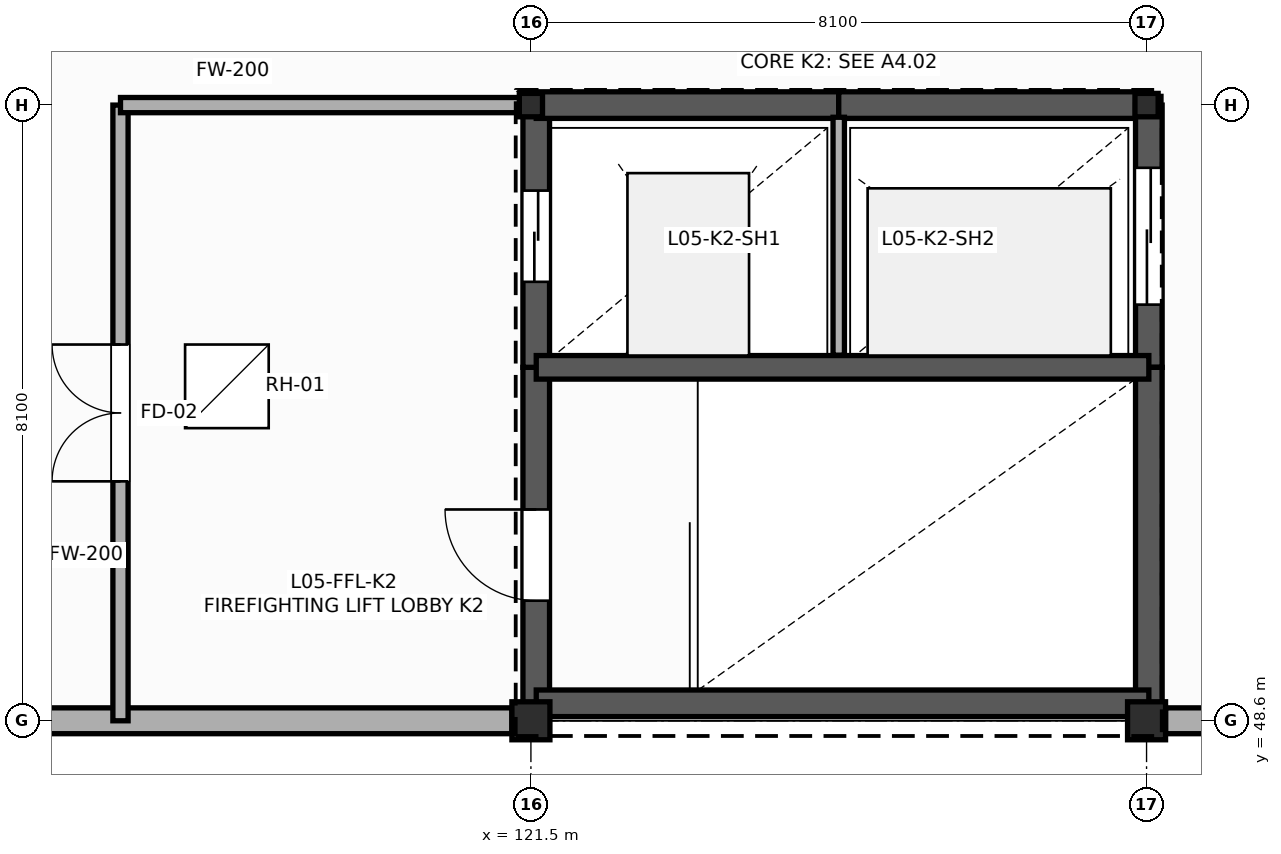
"""IFC4 building model, lengths in metres.
Left out: names, types, materials, properties, quantities, classifications, styles, units other than length and angle.
Written with IfcOpenShell. Run it as: python <this file> out.ifc"""

import sys

from ifc_helpers import new_model, si_unit, direction, frame, frame_2d, origin, origin_2d, place, context, subcontext, project, spatial, rectangle, i_section, extrude, element, fill, save


model = new_model("IFC4")
c1 = context("Model", 3, precision=1e-05, world=origin(), true_north=direction((0.0, 1.0)))
c2 = subcontext(c1, "Body", "Model", "MODEL_VIEW")
j1 = project(units=[si_unit("LENGTHUNIT", "METRE"), si_unit("PLANEANGLEUNIT", "RADIAN")], contexts=[c1])
p1 = place(None, origin())
s1 = spatial("IfcSite", under=j1, at=p1, CompositionType="ELEMENT")
p2 = place(p1, origin())
s2 = spatial("IfcBuilding", under=s1, at=p2, CompositionType="ELEMENT")
p3 = place(p2, frame((0.0, 0.0, 23.4)))
s3 = spatial("IfcBuildingStorey", under=s2, at=p3, CompositionType="ELEMENT", Elevation=23.4)
p4 = place(p3, frame((121.5, 48.6, 0.0), z_axis=(0.0, 0.0, 1.0), x_axis=(1.0, 0.0, 0.0)))
e1 = element("IfcColumn", 1, at=p4, inside=s3, PredefinedType="COLUMN", context=c2, shape_type="SweptSolid", body=[
    extrude(rectangle(XDim=0.5, YDim=0.5, at=origin_2d()), origin(), (0.0, 0.0, 1.0), 4.2),
])
p5 = place(p3, frame((121.5, 56.7, 0.0), z_axis=(0.0, 0.0, 1.0), x_axis=(1.0, 0.0, 0.0)))
e2 = element("IfcColumn", 2, at=p5, inside=s3, PredefinedType="COLUMN", context=c2, shape_type="SweptSolid", body=[
    extrude(i_section(OverallWidth=0.305, OverallDepth=0.308, WebThickness=0.01, FlangeThickness=0.015, FilletRadius=0.015, at=origin_2d()), origin(), (0.0, 0.0, 1.0), 4.2),
])
p6 = place(p3, frame((129.6, 48.6, 0.0), z_axis=(0.0, 0.0, 1.0), x_axis=(1.0, 0.0, 0.0)))
e3 = element("IfcColumn", 3, at=p6, inside=s3, PredefinedType="COLUMN", context=c2, shape_type="SweptSolid", body=[
    extrude(rectangle(XDim=0.5, YDim=0.5, at=origin_2d()), origin(), (0.0, 0.0, 1.0), 4.2),
])
p7 = place(p3, frame((129.6, 56.7, 0.0), z_axis=(0.0, 0.0, 1.0), x_axis=(1.0, 0.0, 0.0)))
e4 = element("IfcColumn", 4, at=p7, inside=s3, PredefinedType="COLUMN", context=c2, shape_type="SweptSolid", body=[
    extrude(i_section(OverallWidth=0.305, OverallDepth=0.308, WebThickness=0.01, FlangeThickness=0.015, FilletRadius=0.015, at=origin_2d()), origin(), (0.0, 0.0, 1.0), 4.2),
])
p8 = place(p3, frame((113.65, 48.6, 0.0), z_axis=(0.0, 0.0, 1.0), x_axis=(1.0, 0.0, 0.0)))
e5 = element("IfcWall", 5, at=p8, inside=s3, PredefinedType="SOLIDWALL", context=c2, shape_type="SweptSolid", body=[
    extrude(rectangle(XDim=7.6, YDim=0.34, at=frame_2d((3.8, 0.0))), origin(), (0.0, 0.0, 1.0), 3.495),
])
p9 = place(p3, frame((129.85, 48.6, 0.0), z_axis=(0.0, 0.0, 1.0), x_axis=(1.0, 0.0, 0.0)))
e6 = element("IfcWall", 6, at=p9, inside=s3, PredefinedType="SOLIDWALL", context=c2, shape_type="SweptSolid", body=[
    extrude(rectangle(XDim=7.6, YDim=0.34, at=frame_2d((3.8, 0.0))), origin(), (0.0, 0.0, 1.0), 3.495),
])
p10 = place(p3, frame((121.57, 48.83, 0.0), z_axis=(0.0, 0.0, 1.0), x_axis=(0.0, 1.0, 0.0)))
e7 = element("IfcWall", 7, at=p10, inside=s3, PredefinedType="SHEAR", context=c2, shape_type="SweptSolid", body=[
    extrude(rectangle(XDim=4.42, YDim=0.35, at=frame_2d((2.21, 0.0))), origin(), (0.0, 0.0, 1.0), 4.2),
])
p11 = place(p10, frame((1.35, 0.0, 0.0)))
e8 = element("IfcOpeningElement", 8, at=p11, cuts=e7, PredefinedType="OPENING", context=c2, shape_type="SweptSolid", body=[
    extrude(rectangle(XDim=1.2, YDim=2.25, at=frame_2d((0.6, 1.125))), frame((0.0, 0.185, 0.0), z_axis=(0.0, -1.0, 0.0), x_axis=(1.0, 0.0, 0.0)), (0.0, 0.0, 1.0), 0.37),
])
p12 = place(p3, frame((121.57, 53.25, 0.0), z_axis=(0.0, 0.0, 1.0), x_axis=(0.0, 1.0, 0.0)))
e9 = element("IfcWall", 9, at=p12, inside=s3, PredefinedType="SHEAR", context=c2, shape_type="SweptSolid", body=[
    extrude(rectangle(XDim=3.45, YDim=0.35, at=frame_2d((1.725, 0.0))), origin(), (0.0, 0.0, 1.0), 4.2),
])
p13 = place(p12, frame((1.125, 0.0, 0.0)))
e10 = element("IfcOpeningElement", 10, at=p13, cuts=e9, PredefinedType="OPENING", context=c2, shape_type="SweptSolid", body=[
    extrude(rectangle(XDim=1.2, YDim=2.2, at=frame_2d((0.6, 1.1))), frame((0.0, 0.185, 0.0), z_axis=(0.0, -1.0, 0.0), x_axis=(1.0, 0.0, 0.0)), (0.0, 0.0, 1.0), 0.37),
])
p14 = place(p3, frame((121.57, 56.7, 0.0), z_axis=(0.0, 0.0, 1.0), x_axis=(1.0, 0.0, 0.0)))
e11 = element("IfcWall", 11, at=p14, inside=s3, PredefinedType="SHEAR", context=c2, shape_type="SweptSolid", body=[
    extrude(rectangle(XDim=3.98, YDim=0.35, at=frame_2d((1.99, 0.0))), origin(), (0.0, 0.0, 1.0), 4.2),
])
p15 = place(p3, frame((125.55, 56.7, 0.0), z_axis=(0.0, 0.0, 1.0), x_axis=(1.0, 0.0, 0.0)))
e12 = element("IfcWall", 12, at=p15, inside=s3, PredefinedType="SHEAR", context=c2, shape_type="SweptSolid", body=[
    extrude(rectangle(XDim=4.08, YDim=0.35, at=frame_2d((2.04, 0.0))), origin(), (0.0, 0.0, 1.0), 4.2),
])
p16 = place(p3, frame((129.63, 56.7, 0.0), z_axis=(0.0, 0.0, 1.0), x_axis=(0.0, -1.0, 0.0)))
e13 = element("IfcWall", 13, at=p16, inside=s3, PredefinedType="SHEAR", context=c2, shape_type="SweptSolid", body=[
    extrude(rectangle(XDim=3.45, YDim=0.35, at=frame_2d((1.725, 0.0))), origin(), (0.0, 0.0, 1.0), 4.2),
])
p17 = place(p16, frame((0.825, 0.0, 0.0)))
e14 = element("IfcOpeningElement", 14, at=p17, cuts=e13, PredefinedType="OPENING", context=c2, shape_type="SweptSolid", body=[
    extrude(rectangle(XDim=1.8, YDim=2.4, at=frame_2d((0.9, 1.2))), frame((0.0, 0.185, 0.0), z_axis=(0.0, -1.0, 0.0), x_axis=(1.0, 0.0, 0.0)), (0.0, 0.0, 1.0), 0.37),
])
p18 = place(p3, frame((129.63, 53.25, 0.0), z_axis=(0.0, 0.0, 1.0), x_axis=(0.0, -1.0, 0.0)))
e15 = element("IfcWall", 15, at=p18, inside=s3, PredefinedType="SHEAR", context=c2, shape_type="SweptSolid", body=[
    extrude(rectangle(XDim=4.42, YDim=0.35, at=frame_2d((2.21, 0.0))), origin(), (0.0, 0.0, 1.0), 4.2),
])
p19 = place(p3, frame((129.63, 48.83, 0.0), z_axis=(0.0, 0.0, 1.0), x_axis=(-1.0, 0.0, 0.0)))
e16 = element("IfcWall", 16, at=p19, inside=s3, PredefinedType="SHEAR", context=c2, shape_type="SweptSolid", body=[
    extrude(rectangle(XDim=8.06, YDim=0.35, at=frame_2d((4.03, 0.0))), origin(), (0.0, 0.0, 1.0), 4.2),
])
p20 = place(p3, frame((121.57, 53.25, 0.0), z_axis=(0.0, 0.0, 1.0), x_axis=(1.0, 0.0, 0.0)))
e17 = element("IfcWall", 17, at=p20, inside=s3, PredefinedType="SHEAR", context=c2, shape_type="SweptSolid", body=[
    extrude(rectangle(XDim=8.06, YDim=0.31, at=frame_2d((4.03, 0.0))), origin(), (0.0, 0.0, 1.0), 4.2),
])
p21 = place(p3, frame((125.55, 53.41, 0.0), z_axis=(0.0, 0.0, 1.0), x_axis=(0.0, 1.0, 0.0)))
e18 = element("IfcWall", 18, at=p21, inside=s3, PredefinedType="PLUMBINGWALL", context=c2, shape_type="SweptSolid", body=[
    extrude(rectangle(XDim=3.13, YDim=0.15, at=frame_2d((1.565, 0.0))), origin(), (0.0, 0.0, 1.0), 3.85),
])
p22 = place(p3, frame((116.1, 48.6, 0.0), z_axis=(0.0, 0.0, 1.0), x_axis=(0.0, 1.0, 0.0)))
e19 = element("IfcWall", 19, at=p22, inside=s3, PredefinedType="PARTITIONING", context=c2, shape_type="SweptSolid", body=[
    extrude(rectangle(XDim=8.1, YDim=0.2, at=frame_2d((4.05, 0.0))), origin(), (0.0, 0.0, 1.0), 3.9),
])
p23 = place(p22, frame((3.15, 0.0, 0.0)))
e20 = element("IfcOpeningElement", 20, at=p23, cuts=e19, PredefinedType="OPENING", context=c2, shape_type="SweptSolid", body=[
    extrude(rectangle(XDim=1.8, YDim=2.25, at=frame_2d((0.9, 1.125))), frame((0.0, 0.11, 0.0), z_axis=(0.0, -1.0, 0.0), x_axis=(1.0, 0.0, 0.0)), (0.0, 0.0, 1.0), 0.22),
])
p24 = place(p3, frame((116.1, 56.7, 0.0), z_axis=(0.0, 0.0, 1.0), x_axis=(1.0, 0.0, 0.0)))
e21 = element("IfcWall", 21, at=p24, inside=s3, PredefinedType="PARTITIONING", context=c2, shape_type="SweptSolid", body=[
    extrude(rectangle(XDim=5.47, YDim=0.2, at=frame_2d((2.735, 0.0))), origin(), (0.0, 0.0, 1.0), 3.356),
])
p25 = place(p2, frame((0.0, 0.0, 27.6)))
p26 = place(p25, frame((0.0, 0.0, -0.23)))
p27 = place(p26, frame((117.5, 53.0, 0.0)))
p28 = place(p27, frame((0.0, 0.0, 0.18)))
e22 = element("IfcDoor", 22, at=p28, inside=s3, OperationType="SINGLE_SWING_LEFT", PredefinedType="TRAPDOOR", context=c2, shape_type="SweptSolid", body=[
    extrude(rectangle(XDim=1.1, YDim=1.1, at=origin_2d()), origin(), (0.0, 0.0, 1.0), 0.05),
])
p29 = place(p11, origin())
e23 = element("IfcDoor", 23, at=p29, inside=s3, OperationType="SINGLE_SWING_RIGHT", PredefinedType="DOOR", context=c2, shape_type="SweptSolid", body=[
    extrude(rectangle(XDim=1.2, YDim=2.25, at=frame_2d((0.6, 1.125))), frame((0.0, 0.025, 0.0), z_axis=(0.0, -1.0, 0.0), x_axis=(1.0, 0.0, 0.0)), (0.0, 0.0, 1.0), 0.05),
])
fill(e8, e23)
p30 = place(p13, origin())
e24 = element("IfcDoor", 24, at=p30, inside=s3, OperationType="SLIDING_TO_LEFT", PredefinedType="DOOR", context=c2, shape_type="SweptSolid", body=[
    extrude(rectangle(XDim=1.2, YDim=2.2, at=frame_2d((0.6, 1.1))), frame((0.0, 0.025, 0.0), z_axis=(0.0, -1.0, 0.0), x_axis=(1.0, 0.0, 0.0)), (0.0, 0.0, 1.0), 0.05),
])
fill(e10, e24)
p31 = place(p17, origin())
e25 = element("IfcDoor", 25, at=p31, inside=s3, OperationType="SLIDING_TO_LEFT", PredefinedType="DOOR", context=c2, shape_type="SweptSolid", body=[
    extrude(rectangle(XDim=1.8, YDim=2.4, at=frame_2d((0.9, 1.2))), frame((0.0, 0.025, 0.0), z_axis=(0.0, -1.0, 0.0), x_axis=(1.0, 0.0, 0.0)), (0.0, 0.0, 1.0), 0.05),
])
fill(e14, e25)
p32 = place(p23, origin())
e26 = element("IfcDoor", 26, at=p32, inside=s3, OperationType="DOUBLE_DOOR_SINGLE_SWING", PredefinedType="DOOR", context=c2, shape_type="SweptSolid", body=[
    extrude(rectangle(XDim=1.8, YDim=2.25, at=frame_2d((0.9, 1.125))), frame((0.0, 0.025, 0.0), z_axis=(0.0, -1.0, 0.0), x_axis=(1.0, 0.0, 0.0)), (0.0, 0.0, 1.0), 0.05),
])
fill(e20, e26)
save(model, sys.argv[1])
